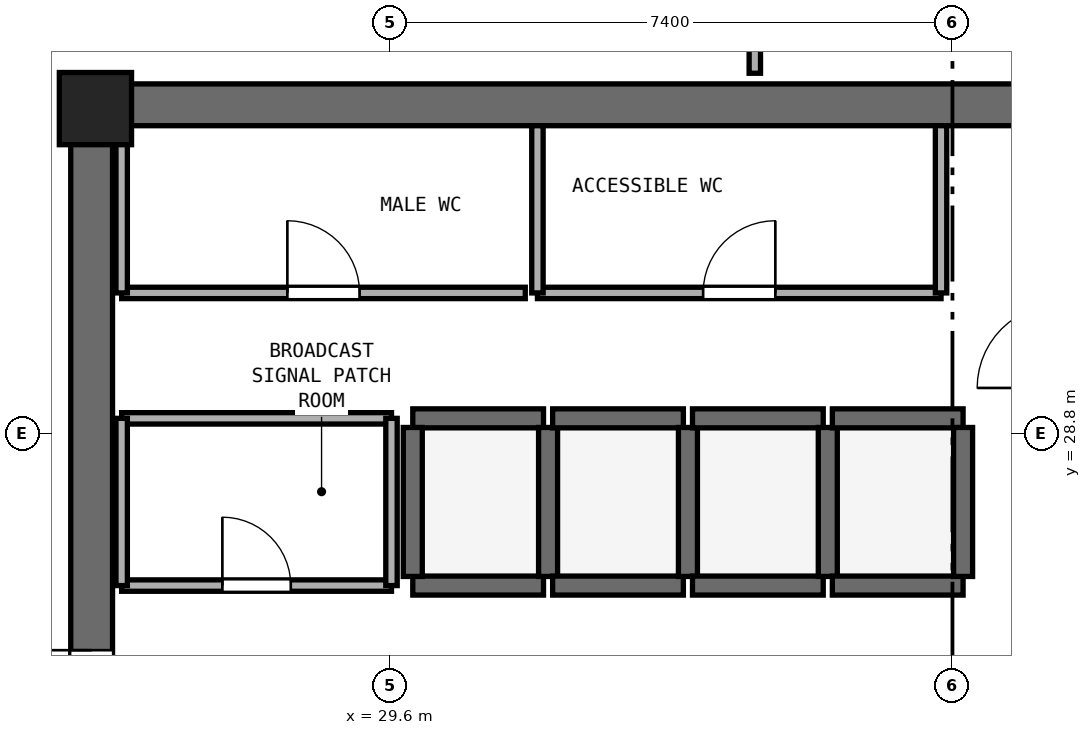
"""IFC4 building model, lengths in metres.
Left out: names, types, materials, properties, quantities, classifications, styles, units other than length and angle.
Written with IfcOpenShell. Run it as: python <this file> out.ifc"""

import sys

from ifc_helpers import new_model, si_unit, direction, frame, frame_2d, origin, origin_2d, place, context, subcontext, project, spatial, rectangle, extrude, element, fill, save


model = new_model("IFC4")
c1 = context("Model", 3, precision=1e-05, world=origin(), true_north=direction((0.0, 1.0)))
c2 = subcontext(c1, "Body", "Model", "MODEL_VIEW")
j1 = project(units=[si_unit("LENGTHUNIT", "METRE"), si_unit("PLANEANGLEUNIT", "RADIAN")], contexts=[c1])
p1 = place(None, origin())
s1 = spatial("IfcSite", under=j1, at=p1, CompositionType="ELEMENT")
p2 = place(p1, origin())
s2 = spatial("IfcBuilding", under=s1, at=p2, CompositionType="ELEMENT")
p3 = place(p2, frame((0.0, 0.0, 212.4)))
s3 = spatial("IfcBuildingStorey", under=s2, at=p3, CompositionType="ELEMENT", Elevation=212.4)
p4 = place(p3, frame((25.4, 33.125, 0.0), z_axis=(0.0, 0.0, 1.0), x_axis=(1.0, 0.0, 0.0)))
e1 = element("IfcWall", 1, at=p4, inside=s3, PredefinedType="SHEAR", context=c2, shape_type="SweptSolid", body=[
    extrude(rectangle(XDim=23.2, YDim=0.55, at=frame_2d((11.6, 0.0))), origin(), (0.0, 0.0, 1.0), 3.54),
])
p5 = place(p3, frame((25.675, 17.55, 0.0), z_axis=(0.0, 0.0, 1.0), x_axis=(0.0, 1.0, 0.0)))
e2 = element("IfcWall", 2, at=p5, inside=s3, PredefinedType="SHEAR", context=c2, shape_type="SweptSolid", body=[
    extrude(rectangle(XDim=15.3, YDim=0.55, at=frame_2d((7.65, 0.0))), origin(), (0.0, 0.0, 1.0), 3.54),
])
p6 = place(p5, frame((6.9, 0.0, 0.0)))
e3 = element("IfcOpeningElement", 3, at=p6, cuts=e2, PredefinedType="OPENING", context=c2, shape_type="SweptSolid", body=[
    extrude(rectangle(XDim=1.5, YDim=2.15, at=frame_2d((0.75, 1.075))), frame((0.0, 0.285, 0.0), z_axis=(0.0, -1.0, 0.0), x_axis=(1.0, 0.0, 0.0)), (0.0, 0.0, 1.0), 0.57),
])
p7 = place(p3, frame((25.725, 33.075, 0.0), z_axis=(0.0, 0.0, 1.0), x_axis=(1.0, 0.0, 0.0)))
e4 = element("IfcColumn", 4, at=p7, inside=s3, PredefinedType="PILASTER", context=c2, shape_type="SweptSolid", body=[
    extrude(rectangle(XDim=0.95, YDim=0.95, at=origin_2d()), origin(), (0.0, 0.0, 1.0), 3.8),
])
for number, where, z_axis, x_axis in (
    (5, (29.9, 26.8, 0.0), (0.0, 0.0, 1.0), (1.0, 0.0, 0.0)),
    (6, (29.9, 29.0, 0.0), (0.0, 0.0, 1.0), (1.0, 0.0, 0.0)),
):
    element("IfcWall", number, at=place(p3, frame(where, z_axis=z_axis, x_axis=x_axis)), inside=s3, PredefinedType="SHEAR", context=c2, shape_type="SweptSolid", body=[
        extrude(rectangle(XDim=1.72, YDim=0.25, at=frame_2d((0.86, 0.0))), origin(), (0.0, 0.0, 1.0), 3.54),
    ])
for number, where, z_axis, x_axis in (
    (7, (29.9, 26.92, 0.0), (0.0, 0.0, 1.0), (0.0, 1.0, 0.0)),
    (8, (31.68, 26.92, 0.0), (0.0, 0.0, 1.0), (0.0, 1.0, 0.0)),
):
    element("IfcWall", number, at=place(p3, frame(where, z_axis=z_axis, x_axis=x_axis)), inside=s3, PredefinedType="SHEAR", context=c2, shape_type="SweptSolid", body=[
        extrude(rectangle(XDim=1.96, YDim=0.25, at=frame_2d((0.98, 0.0))), origin(), (0.0, 0.0, 1.0), 3.54),
    ])
for number, where, z_axis, x_axis in (
    (9, (31.74, 26.8, 0.0), (0.0, 0.0, 1.0), (1.0, 0.0, 0.0)),
    (10, (31.74, 29.0, 0.0), (0.0, 0.0, 1.0), (1.0, 0.0, 0.0)),
):
    element("IfcWall", number, at=place(p3, frame(where, z_axis=z_axis, x_axis=x_axis)), inside=s3, PredefinedType="SHEAR", context=c2, shape_type="SweptSolid", body=[
        extrude(rectangle(XDim=1.72, YDim=0.25, at=frame_2d((0.86, 0.0))), origin(), (0.0, 0.0, 1.0), 3.54),
    ])
p8 = place(p3, frame((33.52, 26.92, 0.0), z_axis=(0.0, 0.0, 1.0), x_axis=(0.0, 1.0, 0.0)))
e11 = element("IfcWall", 11, at=p8, inside=s3, PredefinedType="SHEAR", context=c2, shape_type="SweptSolid", body=[
    extrude(rectangle(XDim=1.96, YDim=0.25, at=frame_2d((0.98, 0.0))), origin(), (0.0, 0.0, 1.0), 3.54),
])
for number, where, z_axis, x_axis in (
    (12, (33.58, 26.8, 0.0), (0.0, 0.0, 1.0), (1.0, 0.0, 0.0)),
    (13, (33.58, 29.0, 0.0), (0.0, 0.0, 1.0), (1.0, 0.0, 0.0)),
):
    element("IfcWall", number, at=place(p3, frame(where, z_axis=z_axis, x_axis=x_axis)), inside=s3, PredefinedType="SHEAR", context=c2, shape_type="SweptSolid", body=[
        extrude(rectangle(XDim=1.72, YDim=0.25, at=frame_2d((0.86, 0.0))), origin(), (0.0, 0.0, 1.0), 3.54),
    ])
p9 = place(p3, frame((35.36, 26.92, 0.0), z_axis=(0.0, 0.0, 1.0), x_axis=(0.0, 1.0, 0.0)))
e14 = element("IfcWall", 14, at=p9, inside=s3, PredefinedType="SHEAR", context=c2, shape_type="SweptSolid", body=[
    extrude(rectangle(XDim=1.96, YDim=0.25, at=frame_2d((0.98, 0.0))), origin(), (0.0, 0.0, 1.0), 3.54),
])
for number, where, z_axis, x_axis in (
    (15, (35.42, 26.8, 0.0), (0.0, 0.0, 1.0), (1.0, 0.0, 0.0)),
    (16, (35.42, 29.0, 0.0), (0.0, 0.0, 1.0), (1.0, 0.0, 0.0)),
):
    element("IfcWall", number, at=place(p3, frame(where, z_axis=z_axis, x_axis=x_axis)), inside=s3, PredefinedType="SHEAR", context=c2, shape_type="SweptSolid", body=[
        extrude(rectangle(XDim=1.72, YDim=0.25, at=frame_2d((0.86, 0.0))), origin(), (0.0, 0.0, 1.0), 3.54),
    ])
p10 = place(p3, frame((37.14, 26.92, 0.0), z_axis=(0.0, 0.0, 1.0), x_axis=(0.0, 1.0, 0.0)))
e17 = element("IfcWall", 17, at=p10, inside=s3, PredefinedType="SHEAR", context=c2, shape_type="SweptSolid", body=[
    extrude(rectangle(XDim=1.96, YDim=0.25, at=frame_2d((0.98, 0.0))), origin(), (0.0, 0.0, 1.0), 3.54),
])
p11 = place(p3, frame((26.07, 30.65, 0.0), z_axis=(0.0, 0.0, 1.0), x_axis=(1.0, 0.0, 0.0)))
e18 = element("IfcWall", 18, at=p11, inside=s3, PredefinedType="PARTITIONING", context=c2, shape_type="SweptSolid", body=[
    extrude(rectangle(XDim=5.31, YDim=0.15, at=frame_2d((2.655, 0.0))), origin(), (0.0, 0.0, 1.0), 3.54),
])
p12 = place(p11, frame((2.18, 0.0, 0.0)))
e19 = element("IfcOpeningElement", 19, at=p12, cuts=e18, PredefinedType="OPENING", context=c2, shape_type="SweptSolid", body=[
    extrude(rectangle(XDim=0.95, YDim=2.1, at=frame_2d((0.475, 1.05))), frame((0.0, 0.085, 0.0), z_axis=(0.0, -1.0, 0.0), x_axis=(1.0, 0.0, 0.0)), (0.0, 0.0, 1.0), 0.17),
])
p13 = place(p3, frame((26.07, 30.65, 0.0), z_axis=(0.0, 0.0, 1.0), x_axis=(0.0, 1.0, 0.0)))
e20 = element("IfcWall", 20, at=p13, inside=s3, PredefinedType="PARTITIONING", context=c2, shape_type="SweptSolid", body=[
    extrude(rectangle(XDim=2.2, YDim=0.15, at=frame_2d((1.1, 0.0))), origin(), (0.0, 0.0, 1.0), 2.64),
])
p14 = place(p3, frame((31.54, 30.65, 0.0), z_axis=(0.0, 0.0, 1.0), x_axis=(1.0, 0.0, 0.0)))
e21 = element("IfcWall", 21, at=p14, inside=s3, PredefinedType="PARTITIONING", context=c2, shape_type="SweptSolid", body=[
    extrude(rectangle(XDim=5.31, YDim=0.15, at=frame_2d((2.655, 0.0))), origin(), (0.0, 0.0, 1.0), 3.54),
])
p15 = place(p14, frame((2.18, 0.0, 0.0)))
e22 = element("IfcOpeningElement", 22, at=p15, cuts=e21, PredefinedType="OPENING", context=c2, shape_type="SweptSolid", body=[
    extrude(rectangle(XDim=0.95, YDim=2.1, at=frame_2d((0.475, 1.05))), frame((0.0, 0.085, 0.0), z_axis=(0.0, -1.0, 0.0), x_axis=(1.0, 0.0, 0.0)), (0.0, 0.0, 1.0), 0.17),
])
for number, where, z_axis, x_axis in (
    (23, (31.54, 30.65, 0.0), (0.0, 0.0, 1.0), (0.0, 1.0, 0.0)),
    (24, (36.85, 30.65, 0.0), (0.0, 0.0, 1.0), (0.0, 1.0, 0.0)),
):
    element("IfcWall", number, at=place(p3, frame(where, z_axis=z_axis, x_axis=x_axis)), inside=s3, PredefinedType="PARTITIONING", context=c2, shape_type="SweptSolid", body=[
        extrude(rectangle(XDim=2.2, YDim=0.15, at=frame_2d((1.1, 0.0))), origin(), (0.0, 0.0, 1.0), 3.54),
    ])
p16 = place(p3, frame((26.07, 26.8, 0.0), z_axis=(0.0, 0.0, 1.0), x_axis=(1.0, 0.0, 0.0)))
e25 = element("IfcWall", 25, at=p16, inside=s3, PredefinedType="PARTITIONING", context=c2, shape_type="SweptSolid", body=[
    extrude(rectangle(XDim=3.55, YDim=0.15, at=frame_2d((1.775, 0.0))), origin(), (0.0, 0.0, 1.0), 3.54),
])
p17 = place(p16, frame((1.325, 0.0, 0.0)))
e26 = element("IfcOpeningElement", 26, at=p17, cuts=e25, PredefinedType="OPENING", context=c2, shape_type="SweptSolid", body=[
    extrude(rectangle(XDim=0.9, YDim=2.1, at=frame_2d((0.45, 1.05))), frame((0.0, 0.085, 0.0), z_axis=(0.0, -1.0, 0.0), x_axis=(1.0, 0.0, 0.0)), (0.0, 0.0, 1.0), 0.17),
])
p18 = place(p3, frame((26.07, 29.0, 0.0), z_axis=(0.0, 0.0, 1.0), x_axis=(1.0, 0.0, 0.0)))
e27 = element("IfcWall", 27, at=p18, inside=s3, PredefinedType="PARTITIONING", context=c2, shape_type="SweptSolid", body=[
    extrude(rectangle(XDim=3.55, YDim=0.15, at=frame_2d((1.775, 0.0))), origin(), (0.0, 0.0, 1.0), 3.54),
])
p19 = place(p3, frame((26.07, 26.8, 0.0), z_axis=(0.0, 0.0, 1.0), x_axis=(0.0, 1.0, 0.0)))
e28 = element("IfcWall", 28, at=p19, inside=s3, PredefinedType="PARTITIONING", context=c2, shape_type="SweptSolid", body=[
    extrude(rectangle(XDim=2.2, YDim=0.15, at=frame_2d((1.1, 0.0))), origin(), (0.0, 0.0, 1.0), 2.64),
])
p20 = place(p3, frame((29.62, 26.8, 0.0), z_axis=(0.0, 0.0, 1.0), x_axis=(0.0, 1.0, 0.0)))
e29 = element("IfcWall", 29, at=p20, inside=s3, PredefinedType="PARTITIONING", context=c2, shape_type="SweptSolid", body=[
    extrude(rectangle(XDim=2.2, YDim=0.15, at=frame_2d((1.1, 0.0))), origin(), (0.0, 0.0, 1.0), 3.54),
])
p21 = place(p3, frame((34.4, 33.54, 0.0), z_axis=(0.0, 0.0, 1.0), x_axis=(0.0, 1.0, 0.0)))
e30 = element("IfcWall", 30, at=p21, inside=s3, PredefinedType="PARTITIONING", context=c2, shape_type="SweptSolid", body=[
    extrude(rectangle(XDim=2.76, YDim=0.15, at=frame_2d((1.38, 0.0))), origin(), (0.0, 0.0, 1.0), 3.54),
])
p22 = place(p6, origin())
e31 = element("IfcDoor", 31, at=p22, inside=s3, OperationType="DOUBLE_DOOR_SINGLE_SWING", PredefinedType="DOOR", context=c2, shape_type="SweptSolid", body=[
    extrude(rectangle(XDim=1.5, YDim=2.15, at=frame_2d((0.75, 1.075))), frame((0.0, 0.025, 0.0), z_axis=(0.0, -1.0, 0.0), x_axis=(1.0, 0.0, 0.0)), (0.0, 0.0, 1.0), 0.05),
])
fill(e3, e31)
p23 = place(p12, origin())
e32 = element("IfcDoor", 32, at=p23, inside=s3, OperationType="SINGLE_SWING_LEFT", PredefinedType="DOOR", context=c2, shape_type="SweptSolid", body=[
    extrude(rectangle(XDim=0.95, YDim=2.1, at=frame_2d((0.475, 1.05))), frame((0.0, 0.025, 0.0), z_axis=(0.0, -1.0, 0.0), x_axis=(1.0, 0.0, 0.0)), (0.0, 0.0, 1.0), 0.05),
])
fill(e19, e32)
p24 = place(p15, origin())
e33 = element("IfcDoor", 33, at=p24, inside=s3, OperationType="SINGLE_SWING_RIGHT", PredefinedType="DOOR", context=c2, shape_type="SweptSolid", body=[
    extrude(rectangle(XDim=0.95, YDim=2.1, at=frame_2d((0.475, 1.05))), frame((0.0, 0.025, 0.0), z_axis=(0.0, -1.0, 0.0), x_axis=(1.0, 0.0, 0.0)), (0.0, 0.0, 1.0), 0.05),
])
fill(e22, e33)
p25 = place(p17, origin())
e34 = element("IfcDoor", 34, at=p25, inside=s3, OperationType="SINGLE_SWING_LEFT", PredefinedType="DOOR", context=c2, shape_type="SweptSolid", body=[
    extrude(rectangle(XDim=0.9, YDim=2.1, at=frame_2d((0.45, 1.05))), frame((0.0, 0.025, 0.0), z_axis=(0.0, -1.0, 0.0), x_axis=(1.0, 0.0, 0.0)), (0.0, 0.0, 1.0), 0.05),
])
fill(e26, e34)
save(model, sys.argv[1])
